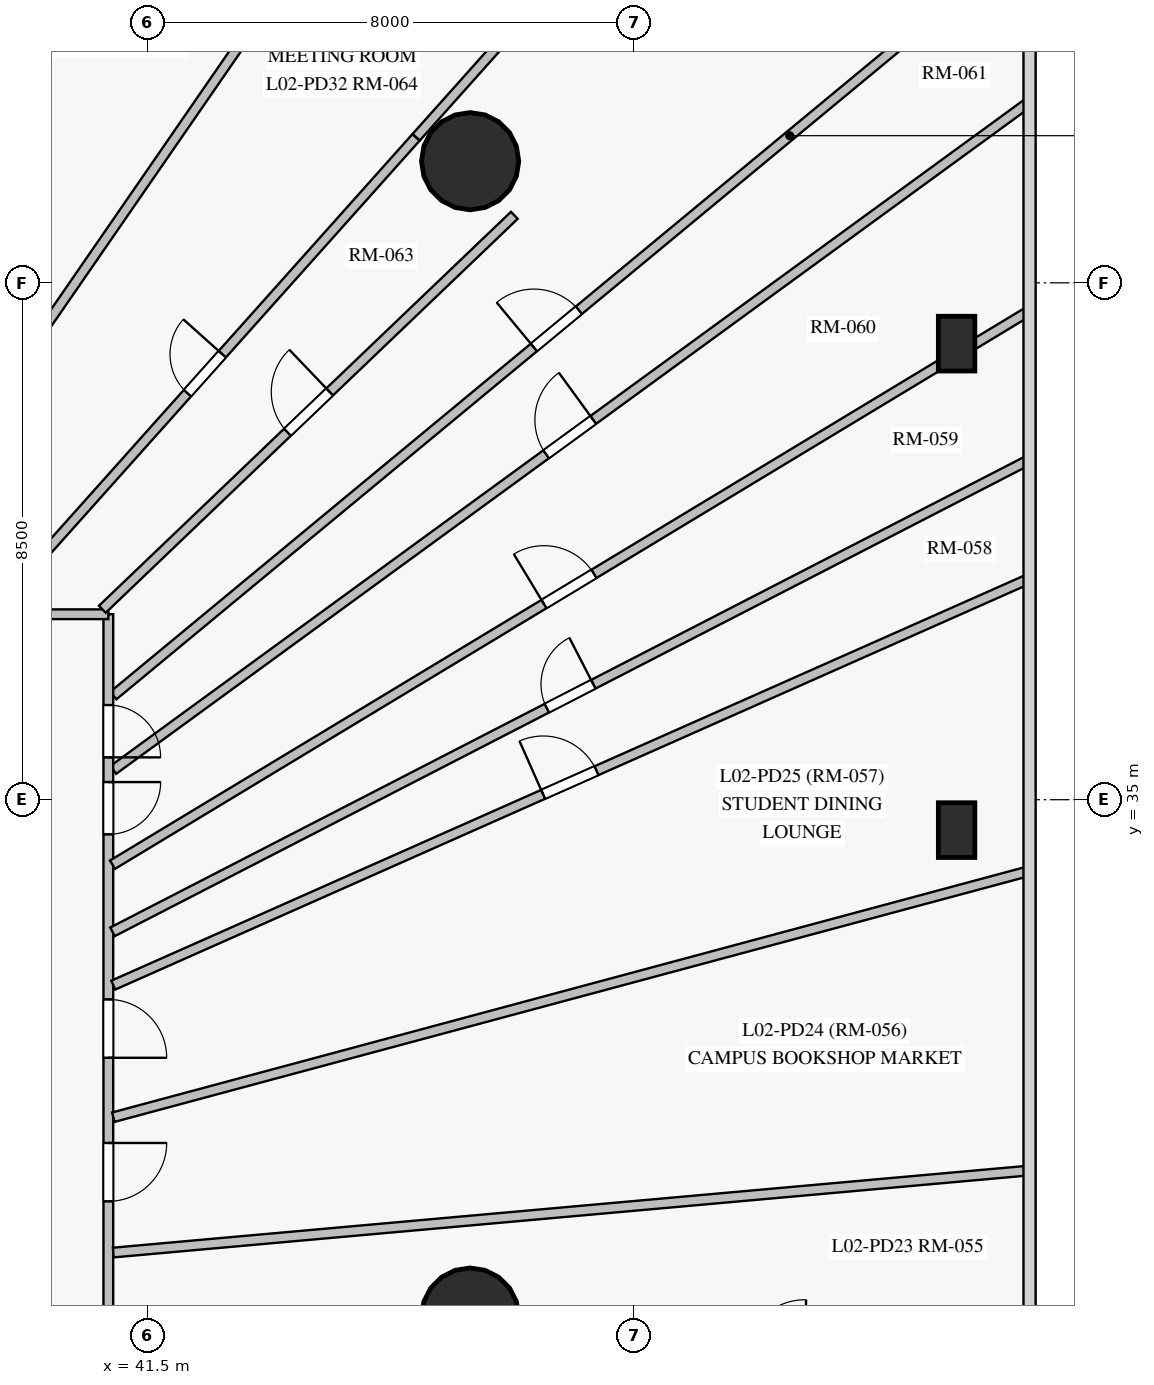
"""IFC4 building model, lengths in metres.
Left out: names, types, materials, properties, quantities, classifications, styles, units other than length and angle.
Written with IfcOpenShell. Run it as: python <this file> out.ifc"""

import sys

from ifc_helpers import new_model, si_unit, direction, frame, frame_2d, origin, origin_with_axes, origin_2d, place, context, subcontext, project, spatial, rectangle, circle, extrude, source, transform, mapped, element, fill, save


model = new_model("IFC4")
c1 = context("Model", 3, precision=1e-05, world=origin(), true_north=direction((0.0, 1.0)))
c2 = subcontext(c1, "Body", "Model", "MODEL_VIEW")
j1 = project(units=[si_unit("LENGTHUNIT", "METRE"), si_unit("PLANEANGLEUNIT", "RADIAN")], contexts=[c1])
p1 = place(None, origin())
s1 = spatial("IfcSite", under=j1, at=p1, CompositionType="ELEMENT")
p2 = place(p1, origin())
s2 = spatial("IfcBuilding", under=s1, at=p2, CompositionType="ELEMENT")
p3 = place(p2, frame((0.0, 0.0, 9.0)))
s3 = spatial("IfcBuildingStorey", under=s2, at=p3, CompositionType="ELEMENT", Elevation=9.0)
m1 = source(origin_with_axes(), c2, "Body", "SweptSolid", [
    extrude(circle(Radius=0.8, at=origin_2d()), origin(), (0.0, 0.0, 1.0), 4.5),
])
for number, where, z_axis, x_axis in (
    (1, (46.8, 26.5, 0.0), (0.0, 0.0, 1.0), (1.0, 0.0, 0.0)),
    (2, (46.8, 45.5, 0.0), (0.0, 0.0, 1.0), (1.0, 0.0, 0.0)),
):
    element("IfcColumn", number, at=place(p3, frame(where, z_axis=z_axis, x_axis=x_axis)), inside=s3, PredefinedType="COLUMN", context=c2, shape_type="MappedRepresentation", body=[
        mapped(m1, transform((0.0, 0.0, 0.0), scale=1.0)),
    ])
m2 = source(origin_with_axes(), c2, "Body", "SweptSolid", [
    extrude(rectangle(XDim=0.6, YDim=0.9, at=origin_2d()), origin(), (0.0, 0.0, 1.0), 4.5),
])
for number, where, z_axis, x_axis in (
    (3, (54.8, 34.5, 0.0), (0.0, 0.0, 1.0), (1.0, 0.0, 0.0)),
    (4, (54.8, 42.5, 0.0), (0.0, 0.0, 1.0), (1.0, 0.0, 0.0)),
):
    element("IfcColumn", number, at=place(p3, frame(where, z_axis=z_axis, x_axis=x_axis)), inside=s3, PredefinedType="PILASTER", context=c2, shape_type="MappedRepresentation", body=[
        mapped(m2, transform((0.0, 0.0, 0.0), scale=1.0)),
    ])
p4 = place(p3, frame((40.932, 36.712, 0.0), z_axis=(0.0, 0.0, 1.0), x_axis=(0.770350004389, 0.637621259635, 0.0)))
e5 = element("IfcWall", 5, at=p4, inside=s3, PredefinedType="PARTITIONING", context=c2, shape_type="SweptSolid", body=[
    extrude(rectangle(XDim=18.942, YDim=0.16, at=frame_2d((9.471, 0.0))), origin(), (0.0, 0.0, 1.0), 4.2),
])
p5 = place(p4, frame((8.979, 0.0, 0.0)))
e6 = element("IfcOpeningElement", 6, at=p5, cuts=e5, PredefinedType="OPENING", context=c2, shape_type="SweptSolid", body=[
    extrude(rectangle(XDim=0.96, YDim=2.15, at=frame_2d((0.48, 1.075))), frame((0.0, 0.09, 0.0), z_axis=(0.0, -1.0, 0.0), x_axis=(1.0, 0.0, 0.0)), (0.0, 0.0, 1.0), 0.18),
])
p6 = place(p3, frame((40.932, 35.49, 0.0), z_axis=(0.0, 0.0, 1.0), x_axis=(0.808014689356, 0.589162339076, 0.0)))
e7 = element("IfcWall", 7, at=p6, inside=s3, PredefinedType="PARTITIONING", context=c2, shape_type="SweptSolid", body=[
    extrude(rectangle(XDim=18.602, YDim=0.16, at=frame_2d((9.301, 0.0))), origin(), (0.0, 0.0, 1.0), 4.2),
])
p7 = place(p6, frame((8.808, 0.0, 0.0)))
e8 = element("IfcOpeningElement", 8, at=p7, cuts=e7, PredefinedType="OPENING", context=c2, shape_type="SweptSolid", body=[
    extrude(rectangle(XDim=0.96, YDim=2.15, at=frame_2d((0.48, 1.075))), frame((0.0, 0.09, 0.0), z_axis=(0.0, -1.0, 0.0), x_axis=(1.0, 0.0, 0.0)), (0.0, 0.0, 1.0), 0.18),
])
p8 = place(p3, frame((40.85, 38.05, 0.0), z_axis=(0.0, 0.0, 1.0), x_axis=(0.0, -1.0, 0.0)))
e9 = element("IfcWall", 9, at=p8, inside=s3, PredefinedType="PARTITIONING", context=c2, shape_type="SweptSolid", body=[
    extrude(rectangle(XDim=18.508, YDim=0.16, at=frame_2d((9.254, 0.0))), origin(), (0.0, 0.0, 1.0), 3.25),
])
p9 = place(p8, frame((13.87, 0.0, 0.0)))
e10 = element("IfcOpeningElement", 10, at=p9, cuts=e9, PredefinedType="OPENING", context=c2, shape_type="SweptSolid", body=[
    extrude(rectangle(XDim=0.96, YDim=2.15, at=frame_2d((0.48, 1.075))), frame((0.0, 0.09, 0.0), z_axis=(0.0, -1.0, 0.0), x_axis=(1.0, 0.0, 0.0)), (0.0, 0.0, 1.0), 0.18),
])
p10 = place(p8, frame((8.695, 0.0, 0.0)))
e11 = element("IfcOpeningElement", 11, at=p10, cuts=e9, PredefinedType="OPENING", context=c2, shape_type="SweptSolid", body=[
    extrude(rectangle(XDim=0.96, YDim=2.15, at=frame_2d((0.48, 1.075))), frame((0.0, 0.09, 0.0), z_axis=(0.0, -1.0, 0.0), x_axis=(1.0, 0.0, 0.0)), (0.0, 0.0, 1.0), 0.18),
])
p11 = place(p8, frame((6.334, 0.0, 0.0)))
e12 = element("IfcOpeningElement", 12, at=p11, cuts=e9, PredefinedType="OPENING", context=c2, shape_type="SweptSolid", body=[
    extrude(rectangle(XDim=0.96, YDim=2.15, at=frame_2d((0.48, 1.075))), frame((0.0, 0.09, 0.0), z_axis=(0.0, -1.0, 0.0), x_axis=(1.0, 0.0, 0.0)), (0.0, 0.0, 1.0), 0.18),
])
p12 = place(p8, frame((12.2, 0.0, 0.0)))
e13 = element("IfcOpeningElement", 13, at=p12, cuts=e9, PredefinedType="OPENING", context=c2, shape_type="SweptSolid", body=[
    extrude(rectangle(XDim=0.96, YDim=2.15, at=frame_2d((0.48, 1.075))), frame((0.0, 0.09, 0.0), z_axis=(0.0, -1.0, 0.0), x_axis=(1.0, 0.0, 0.0)), (0.0, 0.0, 1.0), 0.18),
])
p13 = place(p8, frame((2.76, 0.0, 0.0)))
e14 = element("IfcOpeningElement", 14, at=p13, cuts=e9, PredefinedType="OPENING", context=c2, shape_type="SweptSolid", body=[
    extrude(rectangle(XDim=0.86, YDim=2.04, at=frame_2d((0.43, 1.02))), frame((0.0, 0.09, 0.0), z_axis=(0.0, -1.0, 0.0), x_axis=(1.0, 0.0, 0.0)), (0.0, 0.0, 1.0), 0.18),
])
p14 = place(p8, frame((1.494, 0.0, 0.0)))
e15 = element("IfcOpeningElement", 15, at=p14, cuts=e9, PredefinedType="OPENING", context=c2, shape_type="SweptSolid", body=[
    extrude(rectangle(XDim=0.86, YDim=2.04, at=frame_2d((0.43, 1.02))), frame((0.0, 0.09, 0.0), z_axis=(0.0, -1.0, 0.0), x_axis=(1.0, 0.0, 0.0)), (0.0, 0.0, 1.0), 0.18),
])
p15 = place(p3, frame((40.919, 33.932, 0.0), z_axis=(0.0, 0.0, 1.0), x_axis=(0.855961001887, 0.517040388412, 0.0)))
e16 = element("IfcWall", 16, at=p15, inside=s3, PredefinedType="PARTITIONING", context=c2, shape_type="SweptSolid", body=[
    extrude(rectangle(XDim=17.579, YDim=0.16, at=frame_2d((8.789, 0.0))), origin(), (0.0, 0.0, 1.0), 4.2),
])
p16 = place(p15, frame((8.289, 0.0, 0.0)))
e17 = element("IfcOpeningElement", 17, at=p16, cuts=e16, PredefinedType="OPENING", context=c2, shape_type="SweptSolid", body=[
    extrude(rectangle(XDim=0.96, YDim=2.15, at=frame_2d((0.48, 1.075))), frame((0.0, 0.09, 0.0), z_axis=(0.0, -1.0, 0.0), x_axis=(1.0, 0.0, 0.0)), (0.0, 0.0, 1.0), 0.18),
])
p17 = place(p3, frame((40.919, 32.827, 0.0), z_axis=(0.0, 0.0, 1.0), x_axis=(0.8890624387, 0.457785954452, 0.0)))
e18 = element("IfcWall", 18, at=p17, inside=s3, PredefinedType="PARTITIONING", context=c2, shape_type="SweptSolid", body=[
    extrude(rectangle(XDim=16.927, YDim=0.16, at=frame_2d((8.464, 0.0))), origin(), (0.0, 0.0, 1.0), 4.2),
])
p18 = place(p17, frame((8.033, 0.0, 0.0)))
e19 = element("IfcOpeningElement", 19, at=p18, cuts=e18, PredefinedType="OPENING", context=c2, shape_type="SweptSolid", body=[
    extrude(rectangle(XDim=0.86, YDim=2.04, at=frame_2d((0.43, 1.02))), frame((0.0, 0.09, 0.0), z_axis=(0.0, -1.0, 0.0), x_axis=(1.0, 0.0, 0.0)), (0.0, 0.0, 1.0), 0.18),
])
p19 = place(p3, frame((40.932, 31.951, 0.0), z_axis=(0.0, 0.0, 1.0), x_axis=(0.914043329039, 0.405616558636, 0.0)))
e20 = element("IfcWall", 20, at=p19, inside=s3, PredefinedType="PARTITIONING", context=c2, shape_type="SweptSolid", body=[
    extrude(rectangle(XDim=16.452, YDim=0.16, at=frame_2d((8.226, 0.0))), origin(), (0.0, 0.0, 1.0), 4.2),
])
p20 = place(p19, frame((7.733, 0.0, 0.0)))
e21 = element("IfcOpeningElement", 21, at=p20, cuts=e20, PredefinedType="OPENING", context=c2, shape_type="SweptSolid", body=[
    extrude(rectangle(XDim=0.96, YDim=2.15, at=frame_2d((0.48, 1.075))), frame((0.0, 0.09, 0.0), z_axis=(0.0, -1.0, 0.0), x_axis=(1.0, 0.0, 0.0)), (0.0, 0.0, 1.0), 0.18),
])
p21 = place(p3, frame((40.932, 29.779, 0.0), z_axis=(0.0, 0.0, 1.0), x_axis=(0.96572887565, 0.259552959405, 0.0)))
e22 = element("IfcWall", 22, at=p21, inside=s3, PredefinedType="PARTITIONING", context=c2, shape_type="SweptSolid", body=[
    extrude(rectangle(XDim=15.575, YDim=0.16, at=frame_2d((7.787, 0.0))), origin(), (0.0, 0.0, 1.0), 3.7),
])
p22 = place(p3, frame((25.4, 38.05, 0.0), z_axis=(0.0, 0.0, 1.0), x_axis=(1.0, 0.0, 0.0)))
e23 = element("IfcWall", 23, at=p22, inside=s3, PredefinedType="PARTITIONING", context=c2, shape_type="SweptSolid", body=[
    extrude(rectangle(XDim=15.45, YDim=0.16, at=frame_2d((7.725, 0.0))), origin(), (0.0, 0.0, 1.0), 4.2),
])
p23 = place(p22, frame((11.802, 0.0, 0.0)))
e24 = element("IfcOpeningElement", 24, at=p23, cuts=e23, PredefinedType="OPENING", context=c2, shape_type="SweptSolid", body=[
    extrude(rectangle(XDim=0.96, YDim=2.15, at=frame_2d((0.48, 1.075))), frame((0.0, 0.09, 0.0), z_axis=(0.0, -1.0, 0.0), x_axis=(1.0, 0.0, 0.0)), (0.0, 0.0, 1.0), 0.18),
])
p24 = place(p22, frame((9.567, 0.0, 0.0)))
e25 = element("IfcOpeningElement", 25, at=p24, cuts=e23, PredefinedType="OPENING", context=c2, shape_type="SweptSolid", body=[
    extrude(rectangle(XDim=0.96, YDim=2.15, at=frame_2d((0.48, 1.075))), frame((0.0, 0.09, 0.0), z_axis=(0.0, -1.0, 0.0), x_axis=(1.0, 0.0, 0.0)), (0.0, 0.0, 1.0), 0.18),
])
p25 = place(p22, frame((7.25, 0.0, 0.0)))
e26 = element("IfcOpeningElement", 26, at=p25, cuts=e23, PredefinedType="OPENING", context=c2, shape_type="SweptSolid", body=[
    extrude(rectangle(XDim=0.96, YDim=2.15, at=frame_2d((0.48, 1.075))), frame((0.0, 0.09, 0.0), z_axis=(0.0, -1.0, 0.0), x_axis=(1.0, 0.0, 0.0)), (0.0, 0.0, 1.0), 0.18),
])
p26 = place(p22, frame((4.933, 0.0, 0.0)))
e27 = element("IfcOpeningElement", 27, at=p26, cuts=e23, PredefinedType="OPENING", context=c2, shape_type="SweptSolid", body=[
    extrude(rectangle(XDim=0.96, YDim=2.15, at=frame_2d((0.48, 1.075))), frame((0.0, 0.09, 0.0), z_axis=(0.0, -1.0, 0.0), x_axis=(1.0, 0.0, 0.0)), (0.0, 0.0, 1.0), 0.18),
])
p27 = place(p22, frame((1.698, 0.0, 0.0)))
e28 = element("IfcOpeningElement", 28, at=p27, cuts=e23, PredefinedType="OPENING", context=c2, shape_type="SweptSolid", body=[
    extrude(rectangle(XDim=0.96, YDim=2.15, at=frame_2d((0.48, 1.075))), frame((0.0, 0.09, 0.0), z_axis=(0.0, -1.0, 0.0), x_axis=(1.0, 0.0, 0.0)), (0.0, 0.0, 1.0), 0.18),
])
p28 = place(p22, frame((3.164, 0.0, 0.0)))
e29 = element("IfcOpeningElement", 29, at=p28, cuts=e23, PredefinedType="OPENING", context=c2, shape_type="SweptSolid", body=[
    extrude(rectangle(XDim=0.86, YDim=2.04, at=frame_2d((0.43, 1.02))), frame((0.0, 0.09, 0.0), z_axis=(0.0, -1.0, 0.0), x_axis=(1.0, 0.0, 0.0)), (0.0, 0.0, 1.0), 0.18),
])
p29 = place(p3, frame((40.932, 27.553, 0.0), z_axis=(0.0, 0.0, 1.0), x_axis=(0.996013941628, 0.08919769102, 0.0)))
e30 = element("IfcWall", 30, at=p29, inside=s3, PredefinedType="PARTITIONING", context=c2, shape_type="SweptSolid", body=[
    extrude(rectangle(XDim=15.103, YDim=0.16, at=frame_2d((7.552, 0.0))), origin(), (0.0, 0.0, 1.0), 3.7),
])
p30 = place(p3, frame((36.602, 38.132, 0.0), z_axis=(0.0, 0.0, 1.0), x_axis=(0.568083583137, 0.822970863743, 0.0)))
e31 = element("IfcWall", 31, at=p30, inside=s3, PredefinedType="PARTITIONING", context=c2, shape_type="SweptSolid", body=[
    extrude(rectangle(XDim=14.073, YDim=0.16, at=frame_2d((7.036, 0.0))), origin(), (0.0, 0.0, 1.0), 4.2),
])
p31 = place(p3, frame((34.233, 38.118, 0.0), z_axis=(0.0, 0.0, 1.0), x_axis=(0.438369218091, 0.898794986985, 0.0)))
e32 = element("IfcWall", 32, at=p31, inside=s3, PredefinedType="PARTITIONING", context=c2, shape_type="SweptSolid", body=[
    extrude(rectangle(XDim=12.906, YDim=0.16, at=frame_2d((6.453, 0.0))), origin(), (0.0, 0.0, 1.0), 4.2),
])
p32 = place(p3, frame((38.966, 38.121, 0.0), z_axis=(0.0, 0.0, 1.0), x_axis=(0.666343454818, 0.745644955875, 0.0)))
e33 = element("IfcWall", 33, at=p32, inside=s3, PredefinedType="PARTITIONING", context=c2, shape_type="SweptSolid", body=[
    extrude(rectangle(XDim=10.421, YDim=0.16, at=frame_2d((5.21, 0.0))), origin(), (0.0, 0.0, 1.0), 4.2),
])
p33 = place(p32, frame((4.781, 0.0, 0.0)))
e34 = element("IfcOpeningElement", 34, at=p33, cuts=e33, PredefinedType="OPENING", context=c2, shape_type="SweptSolid", body=[
    extrude(rectangle(XDim=0.86, YDim=2.04, at=frame_2d((0.43, 1.02))), frame((0.0, 0.09, 0.0), z_axis=(0.0, -1.0, 0.0), x_axis=(1.0, 0.0, 0.0)), (0.0, 0.0, 1.0), 0.18),
])
p34 = place(p3, frame((40.752, 38.132, 0.0), z_axis=(0.0, 0.0, 1.0), x_axis=(0.722765157253, 0.69109371829, 0.0)))
e35 = element("IfcWall", 35, at=p34, inside=s3, PredefinedType="PARTITIONING", context=c2, shape_type="SweptSolid", body=[
    extrude(rectangle(XDim=9.374, YDim=0.16, at=frame_2d((4.687, 0.0))), origin(), (0.0, 0.0, 1.0), 3.25),
])
p35 = place(p34, frame((4.212, 0.0, 0.0)))
e36 = element("IfcOpeningElement", 36, at=p35, cuts=e35, PredefinedType="OPENING", context=c2, shape_type="SweptSolid", body=[
    extrude(rectangle(XDim=0.96, YDim=2.15, at=frame_2d((0.48, 1.075))), frame((0.0, 0.09, 0.0), z_axis=(0.0, -1.0, 0.0), x_axis=(1.0, 0.0, 0.0)), (0.0, 0.0, 1.0), 0.18),
])
p36 = place(p3, frame((45.913, 45.895, 0.0), z_axis=(0.0, 0.0, 1.0), x_axis=(0.666346204372, 0.745642498735, 0.0)))
e37 = element("IfcWall", 37, at=p36, inside=s3, PredefinedType="PARTITIONING", context=c2, shape_type="SweptSolid", body=[
    extrude(rectangle(XDim=5.123, YDim=0.16, at=frame_2d((2.562, 0.0))), origin(), (0.0, 0.0, 1.0), 4.2),
])
p37 = place(p36, frame((2.142, 0.0, 0.0)))
e38 = element("IfcOpeningElement", 38, at=p37, cuts=e37, PredefinedType="OPENING", context=c2, shape_type="SweptSolid", body=[
    extrude(rectangle(XDim=0.86, YDim=2.04, at=frame_2d((0.43, 1.02))), frame((0.0, 0.09, 0.0), z_axis=(0.0, -1.0, 0.0), x_axis=(1.0, 0.0, 0.0)), (0.0, 0.0, 1.0), 0.18),
])
m3 = source(origin_with_axes(), c2, "Body", "SweptSolid", [
    extrude(rectangle(XDim=0.96, YDim=2.15, at=frame_2d((0.48, 1.075))), frame((0.0, 0.025, 0.0), z_axis=(0.0, -1.0, 0.0), x_axis=(1.0, 0.0, 0.0)), (0.0, 0.0, 1.0), 0.05),
])
p38 = place(p10, origin())
e39 = element("IfcDoor", 39, at=p38, inside=s3, OperationType="SINGLE_SWING_LEFT", PredefinedType="DOOR", context=c2, shape_type="MappedRepresentation", body=[
    mapped(m3, transform((0.0, 0.0, 0.0), scale=1.0)),
])
fill(e11, e39)
p39 = place(p11, origin())
e40 = element("IfcDoor", 40, at=p39, inside=s3, OperationType="SINGLE_SWING_RIGHT", PredefinedType="DOOR", context=c2, shape_type="MappedRepresentation", body=[
    mapped(m3, transform((0.0, 0.0, 0.0), scale=1.0)),
])
fill(e12, e40)
p40 = place(p20, origin())
e41 = element("IfcDoor", 41, at=p40, inside=s3, OperationType="SINGLE_SWING_LEFT", PredefinedType="DOOR", context=c2, shape_type="MappedRepresentation", body=[
    mapped(m3, transform((0.0, 0.0, 0.0), scale=1.0)),
])
fill(e21, e41)
p41 = place(p16, origin())
e42 = element("IfcDoor", 42, at=p41, inside=s3, OperationType="SINGLE_SWING_LEFT", PredefinedType="DOOR", context=c2, shape_type="MappedRepresentation", body=[
    mapped(m3, transform((0.0, 0.0, 0.0), scale=1.0)),
])
fill(e17, e42)
p42 = place(p7, origin())
e43 = element("IfcDoor", 43, at=p42, inside=s3, OperationType="SINGLE_SWING_RIGHT", PredefinedType="DOOR", context=c2, shape_type="MappedRepresentation", body=[
    mapped(m3, transform((0.0, 0.0, 0.0), scale=1.0)),
])
fill(e8, e43)
p43 = place(p5, origin())
e44 = element("IfcDoor", 44, at=p43, inside=s3, OperationType="SINGLE_SWING_LEFT", PredefinedType="DOOR", context=c2, shape_type="MappedRepresentation", body=[
    mapped(m3, transform((0.0, 0.0, 0.0), scale=1.0)),
])
fill(e6, e44)
p44 = place(p35, origin())
e45 = element("IfcDoor", 45, at=p44, inside=s3, OperationType="SINGLE_SWING_RIGHT", PredefinedType="DOOR", context=c2, shape_type="MappedRepresentation", body=[
    mapped(m3, transform((0.0, 0.0, 0.0), scale=1.0)),
])
fill(e36, e45)
m4 = source(origin_with_axes(), c2, "Body", "SweptSolid", [
    extrude(rectangle(XDim=0.86, YDim=2.04, at=frame_2d((0.43, 1.02))), frame((0.0, 0.025, 0.0), z_axis=(0.0, -1.0, 0.0), x_axis=(1.0, 0.0, 0.0)), (0.0, 0.0, 1.0), 0.05),
])
p45 = place(p18, origin())
e46 = element("IfcDoor", 46, at=p45, inside=s3, OperationType="SINGLE_SWING_RIGHT", PredefinedType="DOOR", context=c2, shape_type="MappedRepresentation", body=[
    mapped(m4, transform((0.0, 0.0, 0.0), scale=1.0)),
])
fill(e19, e46)
p46 = place(p13, origin())
e47 = element("IfcDoor", 47, at=p46, inside=s3, OperationType="SINGLE_SWING_LEFT", PredefinedType="DOOR", context=c2, shape_type="MappedRepresentation", body=[
    mapped(m4, transform((0.0, 0.0, 0.0), scale=1.0)),
])
fill(e14, e47)
p47 = place(p14, origin())
e48 = element("IfcDoor", 48, at=p47, inside=s3, OperationType="SINGLE_SWING_RIGHT", PredefinedType="DOOR", context=c2, shape_type="MappedRepresentation", body=[
    mapped(m4, transform((0.0, 0.0, 0.0), scale=1.0)),
])
fill(e15, e48)
p48 = place(p33, origin())
e49 = element("IfcDoor", 49, at=p48, inside=s3, OperationType="SINGLE_SWING_RIGHT", PredefinedType="DOOR", context=c2, shape_type="MappedRepresentation", body=[
    mapped(m4, transform((0.0, 0.0, 0.0), scale=1.0)),
])
fill(e34, e49)
save(model, sys.argv[1])
